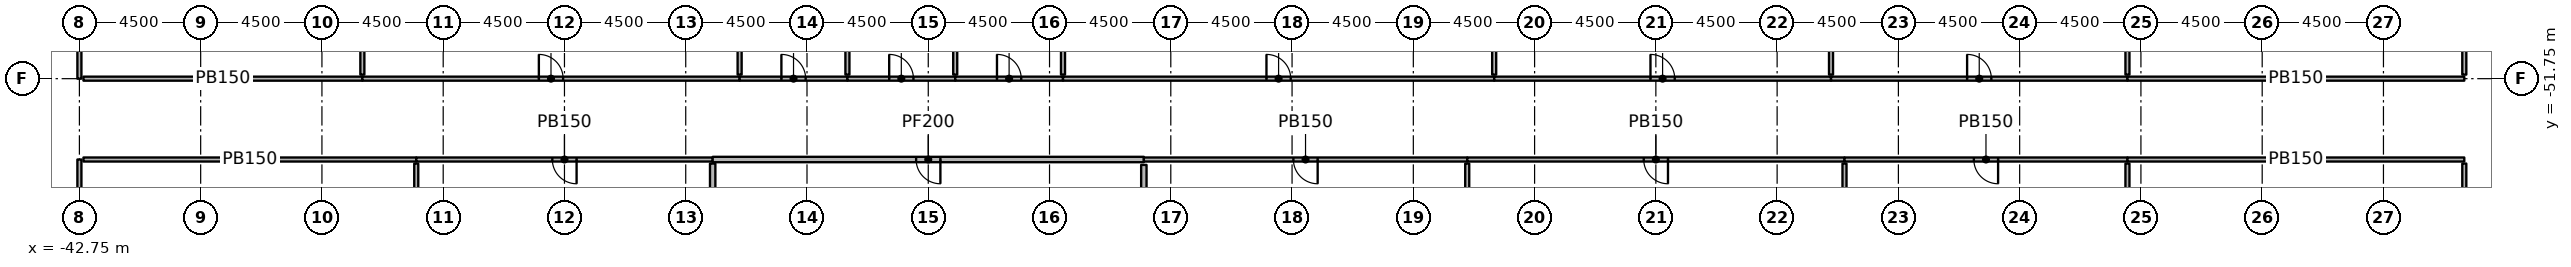
"""IFC4 building model, lengths in metres.
Left out: names, types, materials, properties, quantities, classifications, styles, units other than length and angle.
Written with IfcOpenShell. Run it as: python <this file> out.ifc"""

import sys

from ifc_helpers import new_model, si_unit, direction, frame, frame_2d, origin, place, context, subcontext, project, spatial, rectangle, extrude, element, fill, save


model = new_model("IFC4")
c1 = context("Model", 3, precision=1e-05, world=origin(), true_north=direction((0.0, 1.0)))
c2 = subcontext(c1, "Body", "Model", "MODEL_VIEW")
j1 = project(units=[si_unit("LENGTHUNIT", "METRE"), si_unit("PLANEANGLEUNIT", "RADIAN")], contexts=[c1])
p1 = place(None, origin())
s1 = spatial("IfcSite", under=j1, at=p1, CompositionType="ELEMENT")
p2 = place(p1, origin())
s2 = spatial("IfcBuilding", under=s1, at=p2, CompositionType="ELEMENT")
p3 = place(p2, frame((0.0, 0.0, -8.0)))
s3 = spatial("IfcBuildingStorey", under=s2, at=p3, CompositionType="ELEMENT", Elevation=-8.0)
p4 = place(p3, frame((-42.75, -54.75, 0.0), z_axis=(0.0, 0.0, 1.0), x_axis=(0.0, -1.0, 0.0)))
e1 = element("IfcWall", 1, at=p4, inside=s3, PredefinedType="PARTITIONING", context=c2, shape_type="SweptSolid", body=[
    extrude(rectangle(XDim=15.0, YDim=0.15, at=frame_2d((7.5, 0.0))), origin(), (0.0, 0.0, 1.0), 3.4),
])
p5 = place(p4, frame((7.05, 0.0, 0.0)))
e2 = element("IfcOpeningElement", 2, at=p5, cuts=e1, PredefinedType="OPENING", context=c2, shape_type="SweptSolid", body=[
    extrude(rectangle(XDim=0.9, YDim=2.1, at=frame_2d((0.45, 1.05))), frame((0.0, 0.085, 0.0), z_axis=(0.0, -1.0, 0.0), x_axis=(1.0, 0.0, 0.0)), (0.0, 0.0, 1.0), 0.17),
])
p6 = place(p3, frame((-42.75, -36.75, 0.0), z_axis=(0.0, 0.0, 1.0), x_axis=(0.0, -1.0, 0.0)))
e3 = element("IfcWall", 3, at=p6, inside=s3, PredefinedType="PARTITIONING", context=c2, shape_type="SweptSolid", body=[
    extrude(rectangle(XDim=15.0, YDim=0.15, at=frame_2d((7.5, 0.0))), origin(), (0.0, 0.0, 1.0), 3.4),
])
p7 = place(p6, frame((7.05, 0.0, 0.0)))
e4 = element("IfcOpeningElement", 4, at=p7, cuts=e3, PredefinedType="OPENING", context=c2, shape_type="SweptSolid", body=[
    extrude(rectangle(XDim=0.9, YDim=2.1, at=frame_2d((0.45, 1.05))), frame((0.0, 0.085, 0.0), z_axis=(0.0, -1.0, 0.0), x_axis=(1.0, 0.0, 0.0)), (0.0, 0.0, 1.0), 0.17),
])
p8 = place(p3, frame((-30.25, -54.75, 0.0), z_axis=(0.0, 0.0, 1.0), x_axis=(-1.0, 0.0, 0.0)))
e5 = element("IfcWall", 5, at=p8, inside=s3, PredefinedType="PARTITIONING", context=c2, shape_type="SweptSolid", body=[
    extrude(rectangle(XDim=12.35, YDim=0.15, at=frame_2d((6.175, 0.0))), origin(), (0.0, 0.0, 1.0), 3.4),
])
p9 = place(p3, frame((-19.25, -54.75, 0.0), z_axis=(0.0, 0.0, 1.0), x_axis=(-1.0, 0.0, 0.0)))
e6 = element("IfcWall", 6, at=p9, inside=s3, PredefinedType="PARTITIONING", context=c2, shape_type="SweptSolid", body=[
    extrude(rectangle(XDim=11.0, YDim=0.15, at=frame_2d((5.5, 0.0))), origin(), (0.0, 0.0, 1.0), 3.4),
])
p10 = place(p9, frame((5.05, 0.0, 0.0)))
e7 = element("IfcOpeningElement", 7, at=p10, cuts=e6, PredefinedType="OPENING", context=c2, shape_type="SweptSolid", body=[
    extrude(rectangle(XDim=0.9, YDim=2.1, at=frame_2d((0.45, 1.05))), frame((0.0, 0.085, 0.0), z_axis=(0.0, -1.0, 0.0), x_axis=(1.0, 0.0, 0.0)), (0.0, 0.0, 1.0), 0.17),
])
p11 = place(p3, frame((-3.25, -54.75, 0.0), z_axis=(0.0, 0.0, 1.0), x_axis=(-1.0, 0.0, 0.0)))
e8 = element("IfcWall", 8, at=p11, inside=s3, PredefinedType="PARTITIONING", context=c2, shape_type="SweptSolid", body=[
    extrude(rectangle(XDim=16.0, YDim=0.2, at=frame_2d((8.0, 0.0))), origin(), (0.0, 0.0, 1.0), 3.4),
])
p12 = place(p11, frame((7.55, 0.0, 0.0)))
e9 = element("IfcOpeningElement", 9, at=p12, cuts=e8, PredefinedType="OPENING", context=c2, shape_type="SweptSolid", body=[
    extrude(rectangle(XDim=0.9, YDim=2.1, at=frame_2d((0.45, 1.05))), frame((0.0, 0.11, 0.0), z_axis=(0.0, -1.0, 0.0), x_axis=(1.0, 0.0, 0.0)), (0.0, 0.0, 1.0), 0.22),
])
p13 = place(p3, frame((8.75, -54.75, 0.0), z_axis=(0.0, 0.0, 1.0), x_axis=(-1.0, 0.0, 0.0)))
e10 = element("IfcWall", 10, at=p13, inside=s3, PredefinedType="PARTITIONING", context=c2, shape_type="SweptSolid", body=[
    extrude(rectangle(XDim=12.0, YDim=0.15, at=frame_2d((6.0, 0.0))), origin(), (0.0, 0.0, 1.0), 3.4),
])
p14 = place(p13, frame((5.55, 0.0, 0.0)))
e11 = element("IfcOpeningElement", 11, at=p14, cuts=e10, PredefinedType="OPENING", context=c2, shape_type="SweptSolid", body=[
    extrude(rectangle(XDim=0.9, YDim=2.1, at=frame_2d((0.45, 1.05))), frame((0.0, 0.085, 0.0), z_axis=(0.0, -1.0, 0.0), x_axis=(1.0, 0.0, 0.0)), (0.0, 0.0, 1.0), 0.17),
])
p15 = place(p3, frame((22.75, -54.75, 0.0), z_axis=(0.0, 0.0, 1.0), x_axis=(-1.0, 0.0, 0.0)))
e12 = element("IfcWall", 12, at=p15, inside=s3, PredefinedType="PARTITIONING", context=c2, shape_type="SweptSolid", body=[
    extrude(rectangle(XDim=14.0, YDim=0.15, at=frame_2d((7.0, 0.0))), origin(), (0.0, 0.0, 1.0), 3.4),
])
p16 = place(p15, frame((6.55, 0.0, 0.0)))
e13 = element("IfcOpeningElement", 13, at=p16, cuts=e12, PredefinedType="OPENING", context=c2, shape_type="SweptSolid", body=[
    extrude(rectangle(XDim=0.9, YDim=2.1, at=frame_2d((0.45, 1.05))), frame((0.0, 0.085, 0.0), z_axis=(0.0, -1.0, 0.0), x_axis=(1.0, 0.0, 0.0)), (0.0, 0.0, 1.0), 0.17),
])
p17 = place(p3, frame((33.25, -54.75, 0.0), z_axis=(0.0, 0.0, 1.0), x_axis=(-1.0, 0.0, 0.0)))
e14 = element("IfcWall", 14, at=p17, inside=s3, PredefinedType="PARTITIONING", context=c2, shape_type="SweptSolid", body=[
    extrude(rectangle(XDim=10.5, YDim=0.15, at=frame_2d((5.25, 0.0))), origin(), (0.0, 0.0, 1.0), 3.4),
])
p18 = place(p17, frame((4.8, 0.0, 0.0)))
e15 = element("IfcOpeningElement", 15, at=p18, cuts=e14, PredefinedType="OPENING", context=c2, shape_type="SweptSolid", body=[
    extrude(rectangle(XDim=0.9, YDim=2.1, at=frame_2d((0.45, 1.05))), frame((0.0, 0.085, 0.0), z_axis=(0.0, -1.0, 0.0), x_axis=(1.0, 0.0, 0.0)), (0.0, 0.0, 1.0), 0.17),
])
p19 = place(p3, frame((45.75, -54.75, 0.0), z_axis=(0.0, 0.0, 1.0), x_axis=(-1.0, 0.0, 0.0)))
e16 = element("IfcWall", 16, at=p19, inside=s3, PredefinedType="PARTITIONING", context=c2, shape_type="SweptSolid", body=[
    extrude(rectangle(XDim=12.5, YDim=0.15, at=frame_2d((6.25, 0.0))), origin(), (0.0, 0.0, 1.0), 3.4),
])
p20 = place(p3, frame((-42.6, -51.75, 0.0), z_axis=(0.0, 0.0, 1.0), x_axis=(1.0, 0.0, 0.0)))
e17 = element("IfcWall", 17, at=p20, inside=s3, PredefinedType="PARTITIONING", context=c2, shape_type="SweptSolid", body=[
    extrude(rectangle(XDim=10.35, YDim=0.15, at=frame_2d((5.175, 0.0))), origin(), (0.0, 0.0, 1.0), 3.4),
])
p21 = place(p3, frame((-32.25, -51.75, 0.0), z_axis=(0.0, 0.0, 1.0), x_axis=(1.0, 0.0, 0.0)))
e18 = element("IfcWall", 18, at=p21, inside=s3, PredefinedType="PARTITIONING", context=c2, shape_type="SweptSolid", body=[
    extrude(rectangle(XDim=14.0, YDim=0.15, at=frame_2d((7.0, 0.0))), origin(), (0.0, 0.0, 1.0), 3.4),
])
p22 = place(p21, frame((6.55, 0.0, 0.0)))
e19 = element("IfcOpeningElement", 19, at=p22, cuts=e18, PredefinedType="OPENING", context=c2, shape_type="SweptSolid", body=[
    extrude(rectangle(XDim=0.9, YDim=2.1, at=frame_2d((0.45, 1.05))), frame((0.0, 0.085, 0.0), z_axis=(0.0, -1.0, 0.0), x_axis=(1.0, 0.0, 0.0)), (0.0, 0.0, 1.0), 0.17),
])
p23 = place(p3, frame((-18.25, -51.75, 0.0), z_axis=(0.0, 0.0, 1.0), x_axis=(1.0, 0.0, 0.0)))
e20 = element("IfcWall", 20, at=p23, inside=s3, PredefinedType="PARTITIONING", context=c2, shape_type="SweptSolid", body=[
    extrude(rectangle(XDim=4.0, YDim=0.15, at=frame_2d((2.0, 0.0))), origin(), (0.0, 0.0, 1.0), 3.4),
])
p24 = place(p23, frame((1.55, 0.0, 0.0)))
e21 = element("IfcOpeningElement", 21, at=p24, cuts=e20, PredefinedType="OPENING", context=c2, shape_type="SweptSolid", body=[
    extrude(rectangle(XDim=0.9, YDim=2.1, at=frame_2d((0.45, 1.05))), frame((0.0, 0.085, 0.0), z_axis=(0.0, -1.0, 0.0), x_axis=(1.0, 0.0, 0.0)), (0.0, 0.0, 1.0), 0.17),
])
p25 = place(p3, frame((-14.25, -51.75, 0.0), z_axis=(0.0, 0.0, 1.0), x_axis=(1.0, 0.0, 0.0)))
e22 = element("IfcWall", 22, at=p25, inside=s3, PredefinedType="PARTITIONING", context=c2, shape_type="SweptSolid", body=[
    extrude(rectangle(XDim=4.0, YDim=0.15, at=frame_2d((2.0, 0.0))), origin(), (0.0, 0.0, 1.0), 3.4),
])
p26 = place(p25, frame((1.55, 0.0, 0.0)))
e23 = element("IfcOpeningElement", 23, at=p26, cuts=e22, PredefinedType="OPENING", context=c2, shape_type="SweptSolid", body=[
    extrude(rectangle(XDim=0.9, YDim=2.1, at=frame_2d((0.45, 1.05))), frame((0.0, 0.085, 0.0), z_axis=(0.0, -1.0, 0.0), x_axis=(1.0, 0.0, 0.0)), (0.0, 0.0, 1.0), 0.17),
])
p27 = place(p3, frame((-10.25, -51.75, 0.0), z_axis=(0.0, 0.0, 1.0), x_axis=(1.0, 0.0, 0.0)))
e24 = element("IfcWall", 24, at=p27, inside=s3, PredefinedType="PARTITIONING", context=c2, shape_type="SweptSolid", body=[
    extrude(rectangle(XDim=4.0, YDim=0.15, at=frame_2d((2.0, 0.0))), origin(), (0.0, 0.0, 1.0), 3.4),
])
p28 = place(p27, frame((1.55, 0.0, 0.0)))
e25 = element("IfcOpeningElement", 25, at=p28, cuts=e24, PredefinedType="OPENING", context=c2, shape_type="SweptSolid", body=[
    extrude(rectangle(XDim=0.9, YDim=2.1, at=frame_2d((0.45, 1.05))), frame((0.0, 0.085, 0.0), z_axis=(0.0, -1.0, 0.0), x_axis=(1.0, 0.0, 0.0)), (0.0, 0.0, 1.0), 0.17),
])
p29 = place(p3, frame((-6.25, -51.75, 0.0), z_axis=(0.0, 0.0, 1.0), x_axis=(1.0, 0.0, 0.0)))
e26 = element("IfcWall", 26, at=p29, inside=s3, PredefinedType="PARTITIONING", context=c2, shape_type="SweptSolid", body=[
    extrude(rectangle(XDim=16.0, YDim=0.15, at=frame_2d((8.0, 0.0))), origin(), (0.0, 0.0, 1.0), 3.4),
])
p30 = place(p29, frame((7.55, 0.0, 0.0)))
e27 = element("IfcOpeningElement", 27, at=p30, cuts=e26, PredefinedType="OPENING", context=c2, shape_type="SweptSolid", body=[
    extrude(rectangle(XDim=0.9, YDim=2.1, at=frame_2d((0.45, 1.05))), frame((0.0, 0.085, 0.0), z_axis=(0.0, -1.0, 0.0), x_axis=(1.0, 0.0, 0.0)), (0.0, 0.0, 1.0), 0.17),
])
p31 = place(p3, frame((9.75, -51.75, 0.0), z_axis=(0.0, 0.0, 1.0), x_axis=(1.0, 0.0, 0.0)))
e28 = element("IfcWall", 28, at=p31, inside=s3, PredefinedType="PARTITIONING", context=c2, shape_type="SweptSolid", body=[
    extrude(rectangle(XDim=12.5, YDim=0.15, at=frame_2d((6.25, 0.0))), origin(), (0.0, 0.0, 1.0), 3.4),
])
p32 = place(p31, frame((5.8, 0.0, 0.0)))
e29 = element("IfcOpeningElement", 29, at=p32, cuts=e28, PredefinedType="OPENING", context=c2, shape_type="SweptSolid", body=[
    extrude(rectangle(XDim=0.9, YDim=2.1, at=frame_2d((0.45, 1.05))), frame((0.0, 0.085, 0.0), z_axis=(0.0, -1.0, 0.0), x_axis=(1.0, 0.0, 0.0)), (0.0, 0.0, 1.0), 0.17),
])
p33 = place(p3, frame((22.25, -51.75, 0.0), z_axis=(0.0, 0.0, 1.0), x_axis=(1.0, 0.0, 0.0)))
e30 = element("IfcWall", 30, at=p33, inside=s3, PredefinedType="PARTITIONING", context=c2, shape_type="SweptSolid", body=[
    extrude(rectangle(XDim=11.0, YDim=0.15, at=frame_2d((5.5, 0.0))), origin(), (0.0, 0.0, 1.0), 3.4),
])
p34 = place(p33, frame((5.05, 0.0, 0.0)))
e31 = element("IfcOpeningElement", 31, at=p34, cuts=e30, PredefinedType="OPENING", context=c2, shape_type="SweptSolid", body=[
    extrude(rectangle(XDim=0.9, YDim=2.1, at=frame_2d((0.45, 1.05))), frame((0.0, 0.085, 0.0), z_axis=(0.0, -1.0, 0.0), x_axis=(1.0, 0.0, 0.0)), (0.0, 0.0, 1.0), 0.17),
])
p35 = place(p3, frame((33.25, -51.75, 0.0), z_axis=(0.0, 0.0, 1.0), x_axis=(1.0, 0.0, 0.0)))
e32 = element("IfcWall", 32, at=p35, inside=s3, PredefinedType="PARTITIONING", context=c2, shape_type="SweptSolid", body=[
    extrude(rectangle(XDim=12.5, YDim=0.15, at=frame_2d((6.25, 0.0))), origin(), (0.0, 0.0, 1.0), 3.4),
])
p36 = place(p3, frame((-30.25, -54.9, 0.0), z_axis=(0.0, 0.0, 1.0), x_axis=(0.0, -1.0, 0.0)))
e33 = element("IfcWall", 33, at=p36, inside=s3, PredefinedType="PARTITIONING", context=c2, shape_type="SweptSolid", body=[
    extrude(rectangle(XDim=14.85, YDim=0.15, at=frame_2d((7.425, 0.0))), origin(), (0.0, 0.0, 1.0), 3.4),
])
p37 = place(p3, frame((-19.25, -54.9, 0.0), z_axis=(0.0, 0.0, 1.0), x_axis=(0.0, -1.0, 0.0)))
e34 = element("IfcWall", 34, at=p37, inside=s3, PredefinedType="PARTITIONING", context=c2, shape_type="SweptSolid", body=[
    extrude(rectangle(XDim=14.85, YDim=0.2, at=frame_2d((7.425, 0.0))), origin(), (0.0, 0.0, 1.0), 3.4),
])
p38 = place(p3, frame((-3.25, -54.95, 0.0), z_axis=(0.0, 0.0, 1.0), x_axis=(0.0, -1.0, 0.0)))
e35 = element("IfcWall", 35, at=p38, inside=s3, PredefinedType="PARTITIONING", context=c2, shape_type="SweptSolid", body=[
    extrude(rectangle(XDim=14.8, YDim=0.2, at=frame_2d((7.4, 0.0))), origin(), (0.0, 0.0, 1.0), 3.4),
])
p39 = place(p3, frame((8.75, -54.9, 0.0), z_axis=(0.0, 0.0, 1.0), x_axis=(0.0, -1.0, 0.0)))
e36 = element("IfcWall", 36, at=p39, inside=s3, PredefinedType="PARTITIONING", context=c2, shape_type="SweptSolid", body=[
    extrude(rectangle(XDim=14.85, YDim=0.15, at=frame_2d((7.425, 0.0))), origin(), (0.0, 0.0, 1.0), 3.4),
])
p40 = place(p3, frame((22.75, -54.9, 0.0), z_axis=(0.0, 0.0, 1.0), x_axis=(0.0, -1.0, 0.0)))
e37 = element("IfcWall", 37, at=p40, inside=s3, PredefinedType="PARTITIONING", context=c2, shape_type="SweptSolid", body=[
    extrude(rectangle(XDim=6.0, YDim=0.15, at=frame_2d((3.0, 0.0))), origin(), (0.0, 0.0, 1.0), 3.4),
])
p41 = place(p3, frame((33.25, -54.9, 0.0), z_axis=(0.0, 0.0, 1.0), x_axis=(0.0, -1.0, 0.0)))
e38 = element("IfcWall", 38, at=p41, inside=s3, PredefinedType="PARTITIONING", context=c2, shape_type="SweptSolid", body=[
    extrude(rectangle(XDim=14.85, YDim=0.15, at=frame_2d((7.425, 0.0))), origin(), (0.0, 0.0, 1.0), 3.4),
])
p42 = place(p3, frame((45.75, -69.75, 0.0), z_axis=(0.0, 0.0, 1.0), x_axis=(0.0, 1.0, 0.0)))
e39 = element("IfcWall", 39, at=p42, inside=s3, PredefinedType="PARTITIONING", context=c2, shape_type="SweptSolid", body=[
    extrude(rectangle(XDim=14.85, YDim=0.15, at=frame_2d((7.425, 0.0))), origin(), (0.0, 0.0, 1.0), 3.4),
])
p43 = place(p42, frame((6.975, 0.0, 0.0)))
e40 = element("IfcOpeningElement", 40, at=p43, cuts=e39, PredefinedType="OPENING", context=c2, shape_type="SweptSolid", body=[
    extrude(rectangle(XDim=0.9, YDim=2.1, at=frame_2d((0.45, 1.05))), frame((0.0, 0.085, 0.0), z_axis=(0.0, -1.0, 0.0), x_axis=(1.0, 0.0, 0.0)), (0.0, 0.0, 1.0), 0.17),
])
for number, where, z_axis, x_axis in (
    (41, (-32.25, -36.75, 0.0), (0.0, 0.0, 1.0), (0.0, -1.0, 0.0)),
    (42, (-18.25, -36.75, 0.0), (0.0, 0.0, 1.0), (0.0, -1.0, 0.0)),
    (43, (-14.25, -36.75, 0.0), (0.0, 0.0, 1.0), (0.0, -1.0, 0.0)),
    (44, (-10.25, -36.75, 0.0), (0.0, 0.0, 1.0), (0.0, -1.0, 0.0)),
    (45, (-6.25, -36.75, 0.0), (0.0, 0.0, 1.0), (0.0, -1.0, 0.0)),
    (46, (9.75, -36.75, 0.0), (0.0, 0.0, 1.0), (0.0, -1.0, 0.0)),
):
    element("IfcWall", number, at=place(p3, frame(where, z_axis=z_axis, x_axis=x_axis)), inside=s3, PredefinedType="PARTITIONING", context=c2, shape_type="SweptSolid", body=[
        extrude(rectangle(XDim=14.85, YDim=0.15, at=frame_2d((7.425, 0.0))), origin(), (0.0, 0.0, 1.0), 3.4),
    ])
p44 = place(p3, frame((22.25, -44.1, 0.0), z_axis=(0.0, 0.0, 1.0), x_axis=(0.0, -1.0, 0.0)))
e47 = element("IfcWall", 47, at=p44, inside=s3, PredefinedType="PARTITIONING", context=c2, shape_type="SweptSolid", body=[
    extrude(rectangle(XDim=7.5, YDim=0.15, at=frame_2d((3.75, 0.0))), origin(), (0.0, 0.0, 1.0), 3.4),
])
p45 = place(p3, frame((33.25, -36.75, 0.0), z_axis=(0.0, 0.0, 1.0), x_axis=(0.0, -1.0, 0.0)))
e48 = element("IfcWall", 48, at=p45, inside=s3, PredefinedType="PARTITIONING", context=c2, shape_type="SweptSolid", body=[
    extrude(rectangle(XDim=14.85, YDim=0.15, at=frame_2d((7.425, 0.0))), origin(), (0.0, 0.0, 1.0), 3.4),
])
p46 = place(p3, frame((45.75, -51.6, 0.0), z_axis=(0.0, 0.0, 1.0), x_axis=(0.0, 1.0, 0.0)))
e49 = element("IfcWall", 49, at=p46, inside=s3, PredefinedType="PARTITIONING", context=c2, shape_type="SweptSolid", body=[
    extrude(rectangle(XDim=14.7, YDim=0.15, at=frame_2d((7.35, 0.0))), origin(), (0.0, 0.0, 1.0), 3.4),
])
p47 = place(p46, frame((6.9, 0.0, 0.0)))
e50 = element("IfcOpeningElement", 50, at=p47, cuts=e49, PredefinedType="OPENING", context=c2, shape_type="SweptSolid", body=[
    extrude(rectangle(XDim=0.9, YDim=2.1, at=frame_2d((0.45, 1.05))), frame((0.0, 0.085, 0.0), z_axis=(0.0, -1.0, 0.0), x_axis=(1.0, 0.0, 0.0)), (0.0, 0.0, 1.0), 0.17),
])
p48 = place(p10, origin())
e51 = element("IfcDoor", 51, at=p48, inside=s3, OperationType="SINGLE_SWING_LEFT", PredefinedType="DOOR", context=c2, shape_type="SweptSolid", body=[
    extrude(rectangle(XDim=0.9, YDim=2.1, at=frame_2d((0.45, 1.05))), frame((0.0, 0.025, 0.0), z_axis=(0.0, -1.0, 0.0), x_axis=(1.0, 0.0, 0.0)), (0.0, 0.0, 1.0), 0.05),
])
fill(e7, e51)
p49 = place(p12, origin())
e52 = element("IfcDoor", 52, at=p49, inside=s3, OperationType="SINGLE_SWING_LEFT", PredefinedType="DOOR", context=c2, shape_type="SweptSolid", body=[
    extrude(rectangle(XDim=0.9, YDim=2.1, at=frame_2d((0.45, 1.05))), frame((0.0, 0.025, 0.0), z_axis=(0.0, -1.0, 0.0), x_axis=(1.0, 0.0, 0.0)), (0.0, 0.0, 1.0), 0.05),
])
fill(e9, e52)
p50 = place(p14, origin())
e53 = element("IfcDoor", 53, at=p50, inside=s3, OperationType="SINGLE_SWING_LEFT", PredefinedType="DOOR", context=c2, shape_type="SweptSolid", body=[
    extrude(rectangle(XDim=0.9, YDim=2.1, at=frame_2d((0.45, 1.05))), frame((0.0, 0.025, 0.0), z_axis=(0.0, -1.0, 0.0), x_axis=(1.0, 0.0, 0.0)), (0.0, 0.0, 1.0), 0.05),
])
fill(e11, e53)
p51 = place(p16, origin())
e54 = element("IfcDoor", 54, at=p51, inside=s3, OperationType="SINGLE_SWING_LEFT", PredefinedType="DOOR", context=c2, shape_type="SweptSolid", body=[
    extrude(rectangle(XDim=0.9, YDim=2.1, at=frame_2d((0.45, 1.05))), frame((0.0, 0.025, 0.0), z_axis=(0.0, -1.0, 0.0), x_axis=(1.0, 0.0, 0.0)), (0.0, 0.0, 1.0), 0.05),
])
fill(e13, e54)
p52 = place(p18, origin())
e55 = element("IfcDoor", 55, at=p52, inside=s3, OperationType="SINGLE_SWING_LEFT", PredefinedType="DOOR", context=c2, shape_type="SweptSolid", body=[
    extrude(rectangle(XDim=0.9, YDim=2.1, at=frame_2d((0.45, 1.05))), frame((0.0, 0.025, 0.0), z_axis=(0.0, -1.0, 0.0), x_axis=(1.0, 0.0, 0.0)), (0.0, 0.0, 1.0), 0.05),
])
fill(e15, e55)
p53 = place(p22, origin())
e56 = element("IfcDoor", 56, at=p53, inside=s3, OperationType="SINGLE_SWING_LEFT", PredefinedType="DOOR", context=c2, shape_type="SweptSolid", body=[
    extrude(rectangle(XDim=0.9, YDim=2.1, at=frame_2d((0.45, 1.05))), frame((0.0, 0.025, 0.0), z_axis=(0.0, -1.0, 0.0), x_axis=(1.0, 0.0, 0.0)), (0.0, 0.0, 1.0), 0.05),
])
fill(e19, e56)
p54 = place(p24, origin())
e57 = element("IfcDoor", 57, at=p54, inside=s3, OperationType="SINGLE_SWING_LEFT", PredefinedType="DOOR", context=c2, shape_type="SweptSolid", body=[
    extrude(rectangle(XDim=0.9, YDim=2.1, at=frame_2d((0.45, 1.05))), frame((0.0, 0.025, 0.0), z_axis=(0.0, -1.0, 0.0), x_axis=(1.0, 0.0, 0.0)), (0.0, 0.0, 1.0), 0.05),
])
fill(e21, e57)
p55 = place(p26, origin())
e58 = element("IfcDoor", 58, at=p55, inside=s3, OperationType="SINGLE_SWING_LEFT", PredefinedType="DOOR", context=c2, shape_type="SweptSolid", body=[
    extrude(rectangle(XDim=0.9, YDim=2.1, at=frame_2d((0.45, 1.05))), frame((0.0, 0.025, 0.0), z_axis=(0.0, -1.0, 0.0), x_axis=(1.0, 0.0, 0.0)), (0.0, 0.0, 1.0), 0.05),
])
fill(e23, e58)
p56 = place(p28, origin())
e59 = element("IfcDoor", 59, at=p56, inside=s3, OperationType="SINGLE_SWING_LEFT", PredefinedType="DOOR", context=c2, shape_type="SweptSolid", body=[
    extrude(rectangle(XDim=0.9, YDim=2.1, at=frame_2d((0.45, 1.05))), frame((0.0, 0.025, 0.0), z_axis=(0.0, -1.0, 0.0), x_axis=(1.0, 0.0, 0.0)), (0.0, 0.0, 1.0), 0.05),
])
fill(e25, e59)
p57 = place(p30, origin())
e60 = element("IfcDoor", 60, at=p57, inside=s3, OperationType="SINGLE_SWING_LEFT", PredefinedType="DOOR", context=c2, shape_type="SweptSolid", body=[
    extrude(rectangle(XDim=0.9, YDim=2.1, at=frame_2d((0.45, 1.05))), frame((0.0, 0.025, 0.0), z_axis=(0.0, -1.0, 0.0), x_axis=(1.0, 0.0, 0.0)), (0.0, 0.0, 1.0), 0.05),
])
fill(e27, e60)
p58 = place(p32, origin())
e61 = element("IfcDoor", 61, at=p58, inside=s3, OperationType="SINGLE_SWING_LEFT", PredefinedType="DOOR", context=c2, shape_type="SweptSolid", body=[
    extrude(rectangle(XDim=0.9, YDim=2.1, at=frame_2d((0.45, 1.05))), frame((0.0, 0.025, 0.0), z_axis=(0.0, -1.0, 0.0), x_axis=(1.0, 0.0, 0.0)), (0.0, 0.0, 1.0), 0.05),
])
fill(e29, e61)
p59 = place(p34, origin())
e62 = element("IfcDoor", 62, at=p59, inside=s3, OperationType="SINGLE_SWING_LEFT", PredefinedType="DOOR", context=c2, shape_type="SweptSolid", body=[
    extrude(rectangle(XDim=0.9, YDim=2.1, at=frame_2d((0.45, 1.05))), frame((0.0, 0.025, 0.0), z_axis=(0.0, -1.0, 0.0), x_axis=(1.0, 0.0, 0.0)), (0.0, 0.0, 1.0), 0.05),
])
fill(e31, e62)
save(model, sys.argv[1])
